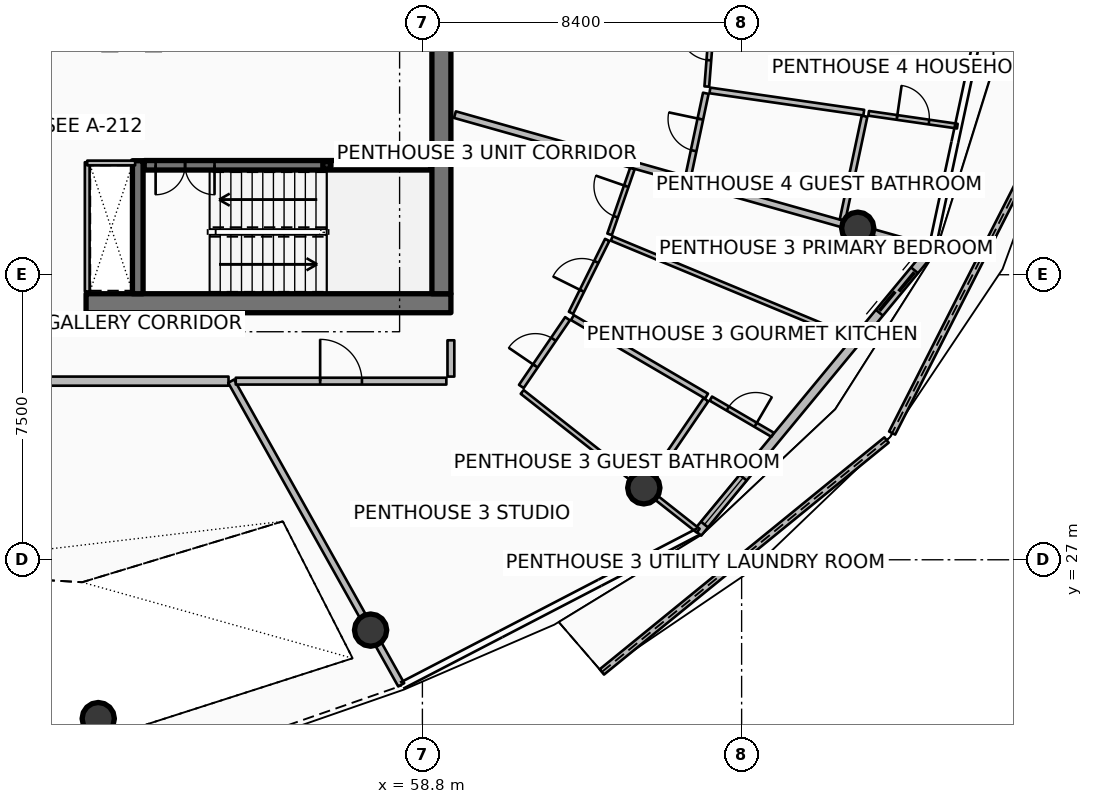
"""IFC4 building model, lengths in metres.
Left out: names, types, materials, properties, quantities, classifications, styles, units other than length and angle.
Written with IfcOpenShell. Run it as: python <this file> out.ifc"""

import sys

from ifc_helpers import new_model, si_unit, direction, frame, frame_2d, origin, origin_2d, place, context, subcontext, project, spatial, polyline, rectangle, hollow_rectangle, circle, outline, extrude, element, fill, save


model = new_model("IFC4")
c1 = context("Model", 3, precision=1e-05, world=origin(), true_north=direction((0.0, 1.0)))
c2 = subcontext(c1, "Body", "Model", "MODEL_VIEW")
j1 = project(units=[si_unit("LENGTHUNIT", "METRE"), si_unit("PLANEANGLEUNIT", "RADIAN")], contexts=[c1])
p1 = place(None, origin())
s1 = spatial("IfcSite", under=j1, at=p1, CompositionType="ELEMENT")
p2 = place(p1, origin())
s2 = spatial("IfcBuilding", under=s1, at=p2, CompositionType="ELEMENT")
p3 = place(p2, frame((0.0, 0.0, 330.5)))
s3 = spatial("IfcBuildingStorey", under=s2, at=p3, CompositionType="ELEMENT", Elevation=330.5)
p4 = place(p3, frame((49.95, 33.75, 0.0), z_axis=(0.0, 0.0, 1.0), x_axis=(1.0, 0.0, 0.0)))
e1 = element("IfcWall", 1, at=p4, inside=s3, PredefinedType="SHEAR", context=c2, shape_type="SweptSolid", body=[
    extrude(rectangle(XDim=9.6, YDim=0.5, at=frame_2d((4.8, 0.0))), origin(), (0.0, 0.0, 1.0), 4.2),
])
p5 = place(p3, frame((59.3, 34.0, 0.0), z_axis=(0.0, 0.0, 1.0), x_axis=(0.0, 1.0, 0.0)))
e2 = element("IfcWall", 2, at=p5, inside=s3, PredefinedType="SHEAR", context=c2, shape_type="SweptSolid", body=[
    extrude(rectangle(XDim=16.0, YDim=0.5, at=frame_2d((8.0, 0.0))), origin(), (0.0, 0.0, 1.0), 4.2),
])
p6 = place(p3, frame((51.31, 34.0, 0.0), z_axis=(0.0, 0.0, 1.0), x_axis=(0.0, 1.0, 0.0)))
e3 = element("IfcWall", 3, at=p6, inside=s3, PredefinedType="SHEAR", context=c2, shape_type="SweptSolid", body=[
    extrude(rectangle(XDim=3.5, YDim=0.28, at=frame_2d((1.75, 0.0))), origin(), (0.0, 0.0, 1.0), 4.2),
])
p7 = place(p3, frame((56.28, 37.38, 0.0), z_axis=(0.0, 0.0, 1.0), x_axis=(1.0, 0.0, 0.0)))
e4 = element("IfcColumn", 4, at=p7, inside=s3, PredefinedType="COLUMN", context=c2, shape_type="SweptSolid", body=[
    extrude(hollow_rectangle(XDim=0.2, YDim=0.2, WallThickness=0.01, InnerFilletRadius=0.01, OuterFilletRadius=0.02, at=origin_2d()), origin(), (0.0, 0.0, 1.0), 1.895),
])
p8 = place(p3, frame((50.27, 22.821, 0.0), z_axis=(0.0, 0.0, 1.0), x_axis=(1.0, 0.0, 0.0)))
e5 = element("IfcColumn", 5, at=p8, inside=s3, PredefinedType="COLUMN", context=c2, shape_type="SweptSolid", body=[
    extrude(circle(Radius=0.425, at=origin_2d()), origin(), (0.0, 0.0, 1.0), 4.196),
])
for number, where, z_axis, x_axis in (
    (6, (57.437, 25.149, 0.0), (0.0, 0.0, 1.0), (1.0, 0.0, 0.0)),
    (7, (64.626, 28.893, 0.0), (0.0, 0.0, 1.0), (1.0, 0.0, 0.0)),
    (8, (70.256, 35.723, 0.0), (0.0, 0.0, 1.0), (1.0, 0.0, 0.0)),
):
    element("IfcColumn", number, at=place(p3, frame(where, z_axis=z_axis, x_axis=x_axis)), inside=s3, PredefinedType="COLUMN", context=c2, shape_type="SweptSolid", body=[
        extrude(circle(Radius=0.425, at=origin_2d()), origin(), (0.0, 0.0, 1.0), 3.94),
    ])
p9 = place(p3, frame((63.522, 24.049, 0.0), z_axis=(0.0, 0.0, 1.0), x_axis=(0.775308764642, 0.631582393255, 0.0)))
e9 = element("IfcWall", 9, at=p9, inside=s3, PredefinedType="PARAPET", context=c2, shape_type="SweptSolid", body=[
    extrude(outline(polyline([(0.0, 0.0), (9.662, 0.0), (9.662, 1.148), (4.831, 1.127), (0.0, 1.224), (0.0, 0.0)])), frame((0.0, 0.09, 0.0), z_axis=(0.0, -1.0, 0.0), x_axis=(1.0, 0.0, 0.0)), (0.0, 0.0, 1.0), 0.18),
])
p10 = place(p3, frame((71.16, 30.334, 0.0), z_axis=(0.0, 0.0, 1.0), x_axis=(0.453352558269, 0.891331284041, 0.0)))
e10 = element("IfcWall", 10, at=p10, inside=s3, PredefinedType="PARAPET", context=c2, shape_type="SweptSolid", body=[
    extrude(outline(polyline([(0.0, 0.0), (10.433, 0.0), (10.433, 1.483), (5.217, 1.284), (0.0, 1.148), (0.0, 0.0)])), frame((0.0, 0.09, 0.0), z_axis=(0.0, -1.0, 0.0), x_axis=(1.0, 0.0, 0.0)), (0.0, 0.0, 1.0), 0.18),
])
p11 = place(p3, frame((66.045, 27.711, 0.0), z_axis=(0.0, 0.0, 1.0), x_axis=(0.636803612721, 0.771026042897, 0.0)))
e11 = element("IfcWall", 11, at=p11, inside=s3, PredefinedType="SOLIDWALL", context=c2, shape_type="SweptSolid", body=[
    extrude(rectangle(XDim=9.728, YDim=0.24, at=frame_2d((4.864, 0.0))), origin(), (0.0, 0.0, 1.0), 2.89),
])
p12 = place(p11, frame((7.508, 0.0, 0.0)))
e12 = element("IfcOpeningElement", 12, at=p12, cuts=e11, PredefinedType="OPENING", context=c2, shape_type="SweptSolid", body=[
    extrude(rectangle(XDim=1.45, YDim=2.15, at=frame_2d((0.725, 1.075))), frame((0.0, 0.13, 0.0), z_axis=(0.0, -1.0, 0.0), x_axis=(1.0, 0.0, 0.0)), (0.0, 0.0, 1.0), 0.26),
])
p13 = place(p11, frame((0.28, 0.0, 0.65)))
e13 = element("IfcOpeningElement", 13, at=p13, cuts=e11, PredefinedType="OPENING", context=c2, shape_type="SweptSolid", body=[
    extrude(rectangle(XDim=1.6, YDim=1.5, at=frame_2d((0.8, 0.75))), frame((0.0, 0.13, 0.0), z_axis=(0.0, -1.0, 0.0), x_axis=(1.0, 0.0, 0.0)), (0.0, 0.0, 1.0), 0.26),
])
p14 = place(p3, frame((51.48, 37.38, 0.0), z_axis=(0.0, 0.0, 1.0), x_axis=(1.0, 0.0, 0.0)))
e14 = element("IfcWall", 14, at=p14, inside=s3, PredefinedType="SOLIDWALL", context=c2, shape_type="SweptSolid", body=[
    extrude(rectangle(XDim=7.54, YDim=0.25, at=frame_2d((3.77, 0.0))), origin(), (0.0, 0.0, 1.0), 3.94),
])
p15 = place(p14, frame((0.3, 0.0, 0.0)))
e15 = element("IfcOpeningElement", 15, at=p15, cuts=e14, PredefinedType="OPENING", context=c2, shape_type="SweptSolid", body=[
    extrude(rectangle(XDim=1.55, YDim=2.15, at=frame_2d((0.775, 1.075))), frame((0.0, 0.135, 0.0), z_axis=(0.0, -1.0, 0.0), x_axis=(1.0, 0.0, 0.0)), (0.0, 0.0, 1.0), 0.27),
])
p16 = place(p3, frame((49.98, 34.06, 0.0), z_axis=(0.0, 0.0, 1.0), x_axis=(0.0, 1.0, 0.0)))
e16 = element("IfcWall", 16, at=p16, inside=s3, PredefinedType="PARTITIONING", context=c2, shape_type="SweptSolid", body=[
    extrude(rectangle(XDim=3.4, YDim=0.125, at=frame_2d((1.7, 0.0))), origin(), (0.0, 0.0, 1.0), 3.38),
])
p17 = place(p3, frame((49.98, 37.44, 0.0), z_axis=(0.0, 0.0, 1.0), x_axis=(1.0, 0.0, 0.0)))
e17 = element("IfcWall", 17, at=p17, inside=s3, PredefinedType="PARTITIONING", context=c2, shape_type="SweptSolid", body=[
    extrude(rectangle(XDim=1.26, YDim=0.125, at=frame_2d((0.63, 0.0))), origin(), (0.0, 0.0, 1.0), 3.38),
])
p18 = place(p3, frame((45.165, 31.7, 0.0), z_axis=(0.0, 0.0, 1.0), x_axis=(1.0, 0.0, 0.0)))
e18 = element("IfcWall", 18, at=p18, inside=s3, PredefinedType="SOLIDWALL", context=c2, shape_type="SweptSolid", body=[
    extrude(rectangle(XDim=8.533, YDim=0.24, at=frame_2d((4.267, 0.0))), origin(), (0.0, 0.0, 1.0), 3.38),
])
p19 = place(p3, frame((53.768, 31.7, 0.0), z_axis=(0.0, 0.0, 1.0), x_axis=(0.488623665245, -0.872494649704, 0.0)))
e19 = element("IfcWall", 19, at=p19, inside=s3, PredefinedType="PARTITIONING", context=c2, shape_type="SweptSolid", body=[
    extrude(rectangle(XDim=9.157, YDim=0.18, at=frame_2d((4.579, 0.0))), origin(), (0.0, 0.0, 1.0), 3.38),
])
p20 = place(p3, frame((59.656, 38.713, 0.0), z_axis=(0.0, 0.0, 1.0), x_axis=(0.962457020055, -0.271434125613, 0.0)))
e20 = element("IfcWall", 20, at=p20, inside=s3, PredefinedType="PARTITIONING", context=c2, shape_type="SweptSolid", body=[
    extrude(rectangle(XDim=12.916, YDim=0.18, at=frame_2d((6.458, 0.0))), origin(), (0.0, 0.0, 1.0), 3.38),
])
p21 = place(p3, frame((53.888, 31.7, 0.0), z_axis=(0.0, 0.0, 1.0), x_axis=(1.0, 0.0, 0.0)))
e21 = element("IfcWall", 21, at=p21, inside=s3, PredefinedType="PARTITIONING", context=c2, shape_type="SweptSolid", body=[
    extrude(rectangle(XDim=5.542, YDim=0.18, at=frame_2d((2.771, 0.0))), origin(), (0.0, 0.0, 1.0), 3.38),
])
p22 = place(p21, frame((2.221, 0.0, 0.0)))
e22 = element("IfcOpeningElement", 22, at=p22, cuts=e21, PredefinedType="OPENING", context=c2, shape_type="SweptSolid", body=[
    extrude(rectangle(XDim=1.1, YDim=2.1, at=frame_2d((0.55, 1.05))), frame((0.0, 0.1, 0.0), z_axis=(0.0, -1.0, 0.0), x_axis=(1.0, 0.0, 0.0)), (0.0, 0.0, 1.0), 0.2),
])
p23 = place(p3, frame((59.55, 31.82, 0.0), z_axis=(0.0, 0.0, 1.0), x_axis=(0.0, 1.0, 0.0)))
e23 = element("IfcWall", 23, at=p23, inside=s3, PredefinedType="PARTITIONING", context=c2, shape_type="SweptSolid", body=[
    extrude(rectangle(XDim=0.955, YDim=0.18, at=frame_2d((0.477, 0.0))), origin(), (0.0, 0.0, 1.0), 3.38),
])
p24 = place(p3, frame((61.426, 31.416, 0.0), z_axis=(0.0, 0.0, 1.0), x_axis=(0.785316001521, -0.619095128196, 0.0)))
e24 = element("IfcWall", 24, at=p24, inside=s3, PredefinedType="PARTITIONING", context=c2, shape_type="SweptSolid", body=[
    extrude(rectangle(XDim=5.897, YDim=0.125, at=frame_2d((2.949, 0.0))), origin(), (0.0, 0.0, 1.0), 3.38),
])
p25 = place(p3, frame((61.404, 31.561, 0.0), z_axis=(0.0, 0.0, 1.0), x_axis=(0.563417581251, 0.826172275701, 0.0)))
e25 = element("IfcWall", 25, at=p25, inside=s3, PredefinedType="PARTITIONING", context=c2, shape_type="SweptSolid", body=[
    extrude(rectangle(XDim=2.157, YDim=0.15, at=frame_2d((1.079, 0.0))), origin(), (0.0, 0.0, 1.0), 3.38),
])
p26 = place(p25, frame((0.654, 0.0, 0.0)))
e26 = element("IfcOpeningElement", 26, at=p26, cuts=e25, PredefinedType="OPENING", context=c2, shape_type="SweptSolid", body=[
    extrude(rectangle(XDim=0.85, YDim=2.06, at=frame_2d((0.425, 1.03))), frame((0.0, 0.085, 0.0), z_axis=(0.0, -1.0, 0.0), x_axis=(1.0, 0.0, 0.0)), (0.0, 0.0, 1.0), 0.17),
])
p27 = place(p3, frame((64.718, 28.948, 0.0), z_axis=(0.0, 0.0, 1.0), x_axis=(0.563428051063, 0.826165135596, 0.0)))
e27 = element("IfcWall", 27, at=p27, inside=s3, PredefinedType="PARTITIONING", context=c2, shape_type="SweptSolid", body=[
    extrude(rectangle(XDim=2.74, YDim=0.15, at=frame_2d((1.37, 0.0))), origin(), (0.0, 0.0, 1.0), 3.38),
])
p28 = place(p3, frame((62.748, 33.372, 0.0), z_axis=(0.0, 0.0, 1.0), x_axis=(0.863113475275, -0.505010028413, 0.0)))
e28 = element("IfcWall", 28, at=p28, inside=s3, PredefinedType="PARTITIONING", context=c2, shape_type="SweptSolid", body=[
    extrude(rectangle(XDim=4.09, YDim=0.15, at=frame_2d((2.045, 0.0))), origin(), (0.0, 0.0, 1.0), 3.38),
])
p29 = place(p3, frame((66.39, 31.241, 0.0), z_axis=(0.0, 0.0, 1.0), x_axis=(0.863105475884, -0.505023699939, 0.0)))
e29 = element("IfcWall", 29, at=p29, inside=s3, PredefinedType="PARTITIONING", context=c2, shape_type="SweptSolid", body=[
    extrude(rectangle(XDim=1.883, YDim=0.125, at=frame_2d((0.941, 0.0))), origin(), (0.0, 0.0, 1.0), 3.38),
])
p30 = place(p29, frame((0.516, 0.0, 0.0)))
e30 = element("IfcOpeningElement", 30, at=p30, cuts=e29, PredefinedType="OPENING", context=c2, shape_type="SweptSolid", body=[
    extrude(rectangle(XDim=0.85, YDim=2.06, at=frame_2d((0.425, 1.03))), frame((0.0, 0.073, 0.0), z_axis=(0.0, -1.0, 0.0), x_axis=(1.0, 0.0, 0.0)), (0.0, 0.0, 1.0), 0.145),
])
p31 = place(p3, frame((63.782, 35.453, 0.0), z_axis=(0.0, 0.0, 1.0), x_axis=(0.923676337231, -0.383173621274, 0.0)))
e31 = element("IfcWall", 31, at=p31, inside=s3, PredefinedType="PARTITIONING", context=c2, shape_type="SweptSolid", body=[
    extrude(rectangle(XDim=6.856, YDim=0.125, at=frame_2d((3.428, 0.0))), origin(), (0.0, 0.0, 1.0), 3.38),
])
p32 = place(p3, frame((62.71, 33.498, 0.0), z_axis=(0.0, 0.0, 1.0), x_axis=(0.44506959559, 0.895495982728, 0.0)))
e32 = element("IfcWall", 32, at=p32, inside=s3, PredefinedType="PARTITIONING", context=c2, shape_type="SweptSolid", body=[
    extrude(rectangle(XDim=2.142, YDim=0.125, at=frame_2d((1.071, 0.0))), origin(), (0.0, 0.0, 1.0), 3.38),
])
p33 = place(p32, frame((0.646, 0.0, 0.0)))
e33 = element("IfcOpeningElement", 33, at=p33, cuts=e32, PredefinedType="OPENING", context=c2, shape_type="SweptSolid", body=[
    extrude(rectangle(XDim=0.85, YDim=2.06, at=frame_2d((0.425, 1.03))), frame((0.0, 0.073, 0.0), z_axis=(0.0, -1.0, 0.0), x_axis=(1.0, 0.0, 0.0)), (0.0, 0.0, 1.0), 0.145),
])
p34 = place(p3, frame((63.725, 35.563, 0.0), z_axis=(0.0, 0.0, 1.0), x_axis=(0.327971997205, 0.944687445163, 0.0)))
e34 = element("IfcWall", 34, at=p34, inside=s3, PredefinedType="PARTITIONING", context=c2, shape_type="SweptSolid", body=[
    extrude(rectangle(XDim=1.83, YDim=0.125, at=frame_2d((0.915, 0.0))), origin(), (0.0, 0.0, 1.0), 3.38),
])
p35 = place(p34, frame((0.49, 0.0, 0.0)))
e35 = element("IfcOpeningElement", 35, at=p35, cuts=e34, PredefinedType="OPENING", context=c2, shape_type="SweptSolid", body=[
    extrude(rectangle(XDim=0.85, YDim=2.06, at=frame_2d((0.425, 1.03))), frame((0.0, 0.073, 0.0), z_axis=(0.0, -1.0, 0.0), x_axis=(1.0, 0.0, 0.0)), (0.0, 0.0, 1.0), 0.145),
])
p36 = place(p3, frame((65.793, 37.085, 0.0), z_axis=(0.0, 0.0, 1.0), x_axis=(0.207539014182, 0.978226741401, 0.0)))
e36 = element("IfcWall", 36, at=p36, inside=s3, PredefinedType="PARTITIONING", context=c2, shape_type="SweptSolid", body=[
    extrude(rectangle(XDim=2.238, YDim=0.15, at=frame_2d((1.119, 0.0))), origin(), (0.0, 0.0, 1.0), 3.38),
])
p37 = place(p36, frame((0.694, 0.0, 0.0)))
e37 = element("IfcOpeningElement", 37, at=p37, cuts=e36, PredefinedType="OPENING", context=c2, shape_type="SweptSolid", body=[
    extrude(rectangle(XDim=0.85, YDim=2.06, at=frame_2d((0.425, 1.03))), frame((0.0, 0.085, 0.0), z_axis=(0.0, -1.0, 0.0), x_axis=(1.0, 0.0, 0.0)), (0.0, 0.0, 1.0), 0.17),
])
p38 = place(p3, frame((69.855, 35.94, 0.0), z_axis=(0.0, 0.0, 1.0), x_axis=(0.207653795029, 0.978202382644, 0.0)))
e38 = element("IfcWall", 38, at=p38, inside=s3, PredefinedType="PARTITIONING", context=c2, shape_type="SweptSolid", body=[
    extrude(rectangle(XDim=2.792, YDim=0.15, at=frame_2d((1.396, 0.0))), origin(), (0.0, 0.0, 1.0), 3.38),
])
p39 = place(p3, frame((66.366, 39.349, 0.0), z_axis=(0.0, 0.0, 1.0), x_axis=(0.989745523023, -0.142841869404, 0.0)))
e39 = element("IfcWall", 39, at=p39, inside=s3, PredefinedType="PARTITIONING", context=c2, shape_type="SweptSolid", body=[
    extrude(rectangle(XDim=4.09, YDim=0.15, at=frame_2d((2.045, 0.0))), origin(), (0.0, 0.0, 1.0), 3.38),
])
p40 = place(p3, frame((70.542, 38.747, 0.0), z_axis=(0.0, 0.0, 1.0), x_axis=(0.989739260165, -0.14288525777, 0.0)))
e40 = element("IfcWall", 40, at=p40, inside=s3, PredefinedType="PARTITIONING", context=c2, shape_type="SweptSolid", body=[
    extrude(rectangle(XDim=2.358, YDim=0.125, at=frame_2d((1.179, 0.0))), origin(), (0.0, 0.0, 1.0), 3.38),
])
p41 = place(p40, frame((0.754, 0.0, 0.0)))
e41 = element("IfcOpeningElement", 41, at=p41, cuts=e40, PredefinedType="OPENING", context=c2, shape_type="SweptSolid", body=[
    extrude(rectangle(XDim=0.85, YDim=2.06, at=frame_2d((0.425, 1.03))), frame((0.0, 0.073, 0.0), z_axis=(0.0, -1.0, 0.0), x_axis=(1.0, 0.0, 0.0)), (0.0, 0.0, 1.0), 0.145),
])
p42 = place(p3, frame((66.284, 39.452, 0.0), z_axis=(0.0, 0.0, 1.0), x_axis=(0.077946923976, 0.996957510149, 0.0)))
e42 = element("IfcWall", 42, at=p42, inside=s3, PredefinedType="PARTITIONING", context=c2, shape_type="SweptSolid", body=[
    extrude(rectangle(XDim=2.24, YDim=0.125, at=frame_2d((1.12, 0.0))), origin(), (0.0, 0.0, 1.0), 3.38),
])
p43 = place(p42, frame((0.695, 0.0, 0.0)))
e43 = element("IfcOpeningElement", 43, at=p43, cuts=e42, PredefinedType="OPENING", context=c2, shape_type="SweptSolid", body=[
    extrude(rectangle(XDim=0.85, YDim=2.06, at=frame_2d((0.425, 1.03))), frame((0.0, 0.073, 0.0), z_axis=(0.0, -1.0, 0.0), x_axis=(1.0, 0.0, 0.0)), (0.0, 0.0, 1.0), 0.145),
])
p44 = place(p12, origin())
e44 = element("IfcDoor", 44, at=p44, inside=s3, OperationType="DOUBLE_DOOR_SLIDING", PredefinedType="DOOR", context=c2, shape_type="SweptSolid", body=[
    extrude(rectangle(XDim=1.45, YDim=2.15, at=frame_2d((0.725, 1.075))), frame((0.0, 0.025, 0.0), z_axis=(0.0, -1.0, 0.0), x_axis=(1.0, 0.0, 0.0)), (0.0, 0.0, 1.0), 0.05),
])
fill(e12, e44)
p45 = place(p13, origin())
e45 = element("IfcWindow", 45, at=p45, inside=s3, PartitioningType="SINGLE_PANEL", PredefinedType="WINDOW", context=c2, shape_type="SweptSolid", body=[
    extrude(rectangle(XDim=1.6, YDim=1.5, at=frame_2d((0.8, 0.75))), frame((0.0, 0.03, 0.0), z_axis=(0.0, -1.0, 0.0), x_axis=(1.0, 0.0, 0.0)), (0.0, 0.0, 1.0), 0.06),
])
fill(e13, e45)
p46 = place(p15, origin())
e46 = element("IfcDoor", 46, at=p46, inside=s3, OperationType="DOUBLE_DOOR_SINGLE_SWING", PredefinedType="DOOR", context=c2, shape_type="SweptSolid", body=[
    extrude(rectangle(XDim=1.55, YDim=2.15, at=frame_2d((0.775, 1.075))), frame((0.0, 0.025, 0.0), z_axis=(0.0, -1.0, 0.0), x_axis=(1.0, 0.0, 0.0)), (0.0, 0.0, 1.0), 0.05),
])
fill(e15, e46)
p47 = place(p22, origin())
e47 = element("IfcDoor", 47, at=p47, inside=s3, OperationType="SINGLE_SWING_LEFT", PredefinedType="DOOR", context=c2, shape_type="SweptSolid", body=[
    extrude(rectangle(XDim=1.1, YDim=2.1, at=frame_2d((0.55, 1.05))), frame((0.0, 0.025, 0.0), z_axis=(0.0, -1.0, 0.0), x_axis=(1.0, 0.0, 0.0)), (0.0, 0.0, 1.0), 0.05),
])
fill(e22, e47)
p48 = place(p26, origin())
e48 = element("IfcDoor", 48, at=p48, inside=s3, OperationType="SINGLE_SWING_LEFT", PredefinedType="DOOR", context=c2, shape_type="SweptSolid", body=[
    extrude(rectangle(XDim=0.85, YDim=2.06, at=frame_2d((0.425, 1.03))), frame((0.0, 0.025, 0.0), z_axis=(0.0, -1.0, 0.0), x_axis=(1.0, 0.0, 0.0)), (0.0, 0.0, 1.0), 0.05),
])
fill(e26, e48)
p49 = place(p30, origin())
e49 = element("IfcDoor", 49, at=p49, inside=s3, OperationType="SINGLE_SWING_RIGHT", PredefinedType="DOOR", context=c2, shape_type="SweptSolid", body=[
    extrude(rectangle(XDim=0.85, YDim=2.06, at=frame_2d((0.425, 1.03))), frame((0.0, 0.025, 0.0), z_axis=(0.0, -1.0, 0.0), x_axis=(1.0, 0.0, 0.0)), (0.0, 0.0, 1.0), 0.05),
])
fill(e30, e49)
p50 = place(p33, origin())
e50 = element("IfcDoor", 50, at=p50, inside=s3, OperationType="SINGLE_SWING_LEFT", PredefinedType="DOOR", context=c2, shape_type="SweptSolid", body=[
    extrude(rectangle(XDim=0.85, YDim=2.06, at=frame_2d((0.425, 1.03))), frame((0.0, 0.025, 0.0), z_axis=(0.0, -1.0, 0.0), x_axis=(1.0, 0.0, 0.0)), (0.0, 0.0, 1.0), 0.05),
])
fill(e33, e50)
p51 = place(p35, origin())
e51 = element("IfcDoor", 51, at=p51, inside=s3, OperationType="SINGLE_SWING_RIGHT", PredefinedType="DOOR", context=c2, shape_type="SweptSolid", body=[
    extrude(rectangle(XDim=0.85, YDim=2.06, at=frame_2d((0.425, 1.03))), frame((0.0, 0.025, 0.0), z_axis=(0.0, -1.0, 0.0), x_axis=(1.0, 0.0, 0.0)), (0.0, 0.0, 1.0), 0.05),
])
fill(e35, e51)
p52 = place(p37, origin())
e52 = element("IfcDoor", 52, at=p52, inside=s3, OperationType="SINGLE_SWING_RIGHT", PredefinedType="DOOR", context=c2, shape_type="SweptSolid", body=[
    extrude(rectangle(XDim=0.85, YDim=2.06, at=frame_2d((0.425, 1.03))), frame((0.0, 0.025, 0.0), z_axis=(0.0, -1.0, 0.0), x_axis=(1.0, 0.0, 0.0)), (0.0, 0.0, 1.0), 0.05),
])
fill(e37, e52)
p53 = place(p41, origin())
e53 = element("IfcDoor", 53, at=p53, inside=s3, OperationType="SINGLE_SWING_LEFT", PredefinedType="DOOR", context=c2, shape_type="SweptSolid", body=[
    extrude(rectangle(XDim=0.85, YDim=2.06, at=frame_2d((0.425, 1.03))), frame((0.0, 0.025, 0.0), z_axis=(0.0, -1.0, 0.0), x_axis=(1.0, 0.0, 0.0)), (0.0, 0.0, 1.0), 0.05),
])
fill(e41, e53)
p54 = place(p43, origin())
e54 = element("IfcDoor", 54, at=p54, inside=s3, OperationType="SINGLE_SWING_RIGHT", PredefinedType="DOOR", context=c2, shape_type="SweptSolid", body=[
    extrude(rectangle(XDim=0.85, YDim=2.06, at=frame_2d((0.425, 1.03))), frame((0.0, 0.025, 0.0), z_axis=(0.0, -1.0, 0.0), x_axis=(1.0, 0.0, 0.0)), (0.0, 0.0, 1.0), 0.05),
])
fill(e43, e54)
save(model, sys.argv[1])
